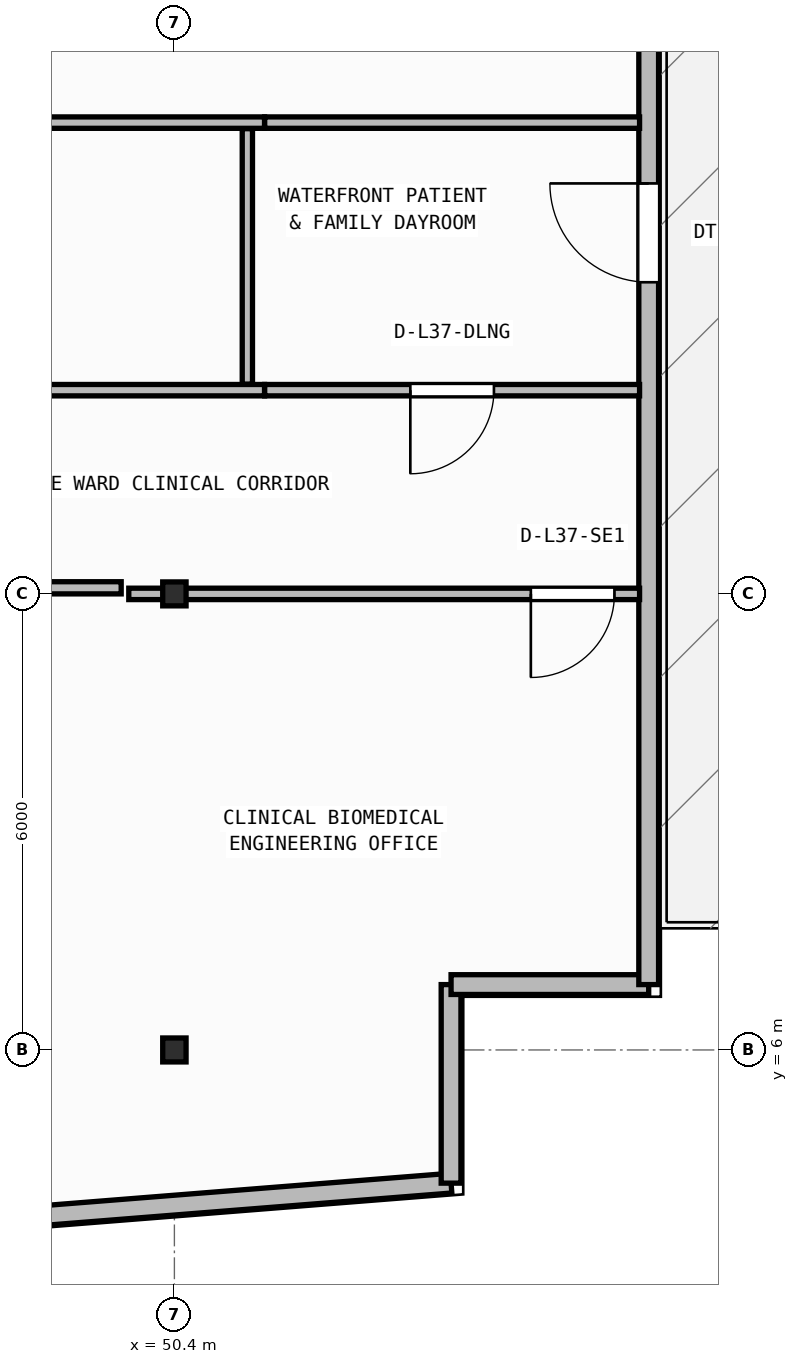
"""IFC4 building model, lengths in metres.
Left out: names, types, materials, properties, quantities, classifications, styles, units other than length and angle.
Written with IfcOpenShell. Run it as: python <this file> out.ifc"""

import sys

from ifc_helpers import new_model, si_unit, direction, frame, frame_2d, origin, origin_2d, place, context, subcontext, project, spatial, rectangle, i_section, extrude, element, fill, save


model = new_model("IFC4")
c1 = context("Model", 3, precision=1e-05, world=origin(), true_north=direction((0.0, 1.0)))
c2 = subcontext(c1, "Body", "Model", "MODEL_VIEW")
j1 = project(units=[si_unit("LENGTHUNIT", "METRE"), si_unit("PLANEANGLEUNIT", "RADIAN")], contexts=[c1])
p1 = place(None, origin())
s1 = spatial("IfcSite", under=j1, at=p1, CompositionType="ELEMENT")
p2 = place(p1, origin())
s2 = spatial("IfcBuilding", under=s1, at=p2, CompositionType="ELEMENT")
p3 = place(p2, frame((0.0, 0.0, 150.75)))
s3 = spatial("IfcBuildingStorey", under=s2, at=p3, CompositionType="ELEMENT", Elevation=150.75)
for number, where, z_axis, x_axis in (
    (1, (50.4, 6.0, 0.0), (0.0, 0.0, 1.0), (1.0, 0.0, 0.0)),
    (2, (50.4, 12.0, 0.0), (0.0, 0.0, 1.0), (1.0, 0.0, 0.0)),
):
    element("IfcColumn", number, at=place(p3, frame(where, z_axis=z_axis, x_axis=x_axis)), inside=s3, PredefinedType="COLUMN", context=c2, shape_type="SweptSolid", body=[
        extrude(i_section(OverallWidth=0.307, OverallDepth=0.315, WebThickness=0.012, FlangeThickness=0.019, FilletRadius=0.017, at=origin_2d()), origin(), (0.0, 0.0, 1.0), 3.95),
    ])
p4 = place(p3, frame((2.76, 0.173, 0.0), z_axis=(0.0, 0.0, 1.0), x_axis=(0.996857931723, 0.079210251617, 0.0)))
e3 = element("IfcWall", 3, at=p4, inside=s3, PredefinedType="STANDARD", context=c2, shape_type="SweptSolid", body=[
    extrude(rectangle(XDim=51.442, YDim=0.26, at=frame_2d((25.721, 0.0))), origin(), (0.0, 0.0, 1.0), 3.71),
])
p5 = place(p4, frame((24.521, 0.0, 0.9)))
e4 = element("IfcOpeningElement", 4, at=p5, cuts=e3, PredefinedType="OPENING", context=c2, shape_type="SweptSolid", body=[
    extrude(rectangle(XDim=2.4, YDim=1.65, at=frame_2d((1.2, 0.825))), frame((0.0, 0.14, 0.0), z_axis=(0.0, -1.0, 0.0), x_axis=(1.0, 0.0, 0.0)), (0.0, 0.0, 1.0), 0.28),
])
p6 = place(p3, frame((54.04, 4.248, 0.0), z_axis=(0.0, 0.0, 1.0), x_axis=(0.0, 1.0, 0.0)))
e5 = element("IfcWall", 5, at=p6, inside=s3, PredefinedType="STANDARD", context=c2, shape_type="SweptSolid", body=[
    extrude(rectangle(XDim=2.612, YDim=0.26, at=frame_2d((1.306, 0.0))), origin(), (0.0, 0.0, 1.0), 3.71),
])
p7 = place(p3, frame((54.04, 6.86, 0.0), z_axis=(0.0, 0.0, 1.0), x_axis=(1.0, 0.0, 0.0)))
e6 = element("IfcWall", 6, at=p7, inside=s3, PredefinedType="STANDARD", context=c2, shape_type="SweptSolid", body=[
    extrude(rectangle(XDim=2.6, YDim=0.26, at=frame_2d((1.3, 0.0))), origin(), (0.0, 0.0, 1.0), 3.71),
])
p8 = place(p3, frame((56.64, 6.86, 0.0), z_axis=(0.0, 0.0, 1.0), x_axis=(0.0, 1.0, 0.0)))
e7 = element("IfcWall", 7, at=p8, inside=s3, PredefinedType="STANDARD", context=c2, shape_type="SweptSolid", body=[
    extrude(rectangle(XDim=23.48, YDim=0.26, at=frame_2d((11.74, 0.0))), origin(), (0.0, 0.0, 1.0), 3.71),
])
p9 = place(p8, frame((9.24, 0.0, 0.0)))
e8 = element("IfcOpeningElement", 8, at=p9, cuts=e7, PredefinedType="OPENING", context=c2, shape_type="SweptSolid", body=[
    extrude(rectangle(XDim=1.3, YDim=2.15, at=frame_2d((0.65, 1.075))), frame((0.0, 0.14, 0.0), z_axis=(0.0, -1.0, 0.0), x_axis=(1.0, 0.0, 0.0)), (0.0, 0.0, 1.0), 0.28),
])
p10 = place(p3, frame((56.52, 12.0, 0.0), z_axis=(0.0, 0.0, 1.0), x_axis=(-1.0, 0.0, 0.0)))
e9 = element("IfcWall", 9, at=p10, inside=s3, PredefinedType="PARTITIONING", context=c2, shape_type="SweptSolid", body=[
    extrude(rectangle(XDim=6.72, YDim=0.15, at=frame_2d((3.36, 0.0))), origin(), (0.0, 0.0, 1.0), 3.083),
])
p11 = place(p10, frame((0.331, 0.0, 0.0)))
e10 = element("IfcOpeningElement", 10, at=p11, cuts=e9, PredefinedType="OPENING", context=c2, shape_type="SweptSolid", body=[
    extrude(rectangle(XDim=1.1, YDim=2.1, at=frame_2d((0.55, 1.05))), frame((0.0, 0.085, 0.0), z_axis=(0.0, -1.0, 0.0), x_axis=(1.0, 0.0, 0.0)), (0.0, 0.0, 1.0), 0.17),
])
p12 = place(p3, frame((51.586, 14.68, 0.0), z_axis=(0.0, 0.0, 1.0), x_axis=(-1.0, 0.0, 0.0)))
e11 = element("IfcWall", 11, at=p12, inside=s3, PredefinedType="PARTITIONING", context=c2, shape_type="SweptSolid", body=[
    extrude(rectangle(XDim=12.248, YDim=0.15, at=frame_2d((6.124, 0.0))), origin(), (0.0, 0.0, 1.0), 3.71),
])
p13 = place(p12, frame((5.574, 0.0, 0.0)))
e12 = element("IfcOpeningElement", 12, at=p13, cuts=e11, PredefinedType="OPENING", context=c2, shape_type="SweptSolid", body=[
    extrude(rectangle(XDim=1.1, YDim=2.1, at=frame_2d((0.55, 1.05))), frame((0.0, 0.085, 0.0), z_axis=(0.0, -1.0, 0.0), x_axis=(1.0, 0.0, 0.0)), (0.0, 0.0, 1.0), 0.17),
])
p14 = place(p3, frame((56.52, 14.68, 0.0), z_axis=(0.0, 0.0, 1.0), x_axis=(-1.0, 0.0, 0.0)))
e13 = element("IfcWall", 13, at=p14, inside=s3, PredefinedType="PARTITIONING", context=c2, shape_type="SweptSolid", body=[
    extrude(rectangle(XDim=4.932, YDim=0.15, at=frame_2d((2.466, 0.0))), origin(), (0.0, 0.0, 1.0), 3.71),
])
p15 = place(p14, frame((1.916, 0.0, 0.0)))
e14 = element("IfcOpeningElement", 14, at=p15, cuts=e13, PredefinedType="OPENING", context=c2, shape_type="SweptSolid", body=[
    extrude(rectangle(XDim=1.1, YDim=2.1, at=frame_2d((0.55, 1.05))), frame((0.0, 0.085, 0.0), z_axis=(0.0, -1.0, 0.0), x_axis=(1.0, 0.0, 0.0)), (0.0, 0.0, 1.0), 0.17),
])
p16 = place(p3, frame((39.338, 18.2, 0.0), z_axis=(0.0, 0.0, 1.0), x_axis=(1.0, 0.0, 0.0)))
e15 = element("IfcWall", 15, at=p16, inside=s3, PredefinedType="PARTITIONING", context=c2, shape_type="SweptSolid", body=[
    extrude(rectangle(XDim=12.248, YDim=0.15, at=frame_2d((6.124, 0.0))), origin(), (0.0, 0.0, 1.0), 3.71),
])
p17 = place(p3, frame((51.588, 18.2, 0.0), z_axis=(0.0, 0.0, 1.0), x_axis=(1.0, 0.0, 0.0)))
e16 = element("IfcWall", 16, at=p17, inside=s3, PredefinedType="PARTITIONING", context=c2, shape_type="SweptSolid", body=[
    extrude(rectangle(XDim=4.932, YDim=0.15, at=frame_2d((2.466, 0.0))), origin(), (0.0, 0.0, 1.0), 3.71),
])
p18 = place(p3, frame((51.36, 14.76, 0.0), z_axis=(0.0, 0.0, 1.0), x_axis=(0.0, 1.0, 0.0)))
e17 = element("IfcWall", 17, at=p18, inside=s3, PredefinedType="PARTITIONING", context=c2, shape_type="SweptSolid", body=[
    extrude(rectangle(XDim=3.36, YDim=0.135, at=frame_2d((1.68, 0.0))), origin(), (0.0, 0.0, 1.0), 3.71),
])
p19 = place(p3, frame((46.689, 12.08, 0.0), z_axis=(0.0, 0.0, 1.0), x_axis=(1.0, 0.0, 0.0)))
e18 = element("IfcWall", 18, at=p19, inside=s3, PredefinedType="PARTITIONING", context=c2, shape_type="SweptSolid", body=[
    extrude(rectangle(XDim=3.011, YDim=0.16, at=frame_2d((1.505, 0.0))), origin(), (0.0, 0.0, 1.0), 3.083),
])
p20 = place(p9, origin())
e19 = element("IfcDoor", 19, at=p20, inside=s3, OperationType="SINGLE_SWING_RIGHT", PredefinedType="DOOR", context=c2, shape_type="SweptSolid", body=[
    extrude(rectangle(XDim=1.3, YDim=2.15, at=frame_2d((0.65, 1.075))), frame((0.0, 0.025, 0.0), z_axis=(0.0, -1.0, 0.0), x_axis=(1.0, 0.0, 0.0)), (0.0, 0.0, 1.0), 0.05),
])
fill(e8, e19)
p21 = place(p11, origin())
e20 = element("IfcDoor", 20, at=p21, inside=s3, OperationType="SINGLE_SWING_RIGHT", PredefinedType="DOOR", context=c2, shape_type="SweptSolid", body=[
    extrude(rectangle(XDim=1.1, YDim=2.1, at=frame_2d((0.55, 1.05))), frame((0.0, 0.025, 0.0), z_axis=(0.0, -1.0, 0.0), x_axis=(1.0, 0.0, 0.0)), (0.0, 0.0, 1.0), 0.05),
])
fill(e10, e20)
p22 = place(p15, origin())
e21 = element("IfcDoor", 21, at=p22, inside=s3, OperationType="SINGLE_SWING_RIGHT", PredefinedType="DOOR", context=c2, shape_type="SweptSolid", body=[
    extrude(rectangle(XDim=1.1, YDim=2.1, at=frame_2d((0.55, 1.05))), frame((0.0, 0.025, 0.0), z_axis=(0.0, -1.0, 0.0), x_axis=(1.0, 0.0, 0.0)), (0.0, 0.0, 1.0), 0.05),
])
fill(e14, e21)
save(model, sys.argv[1])
